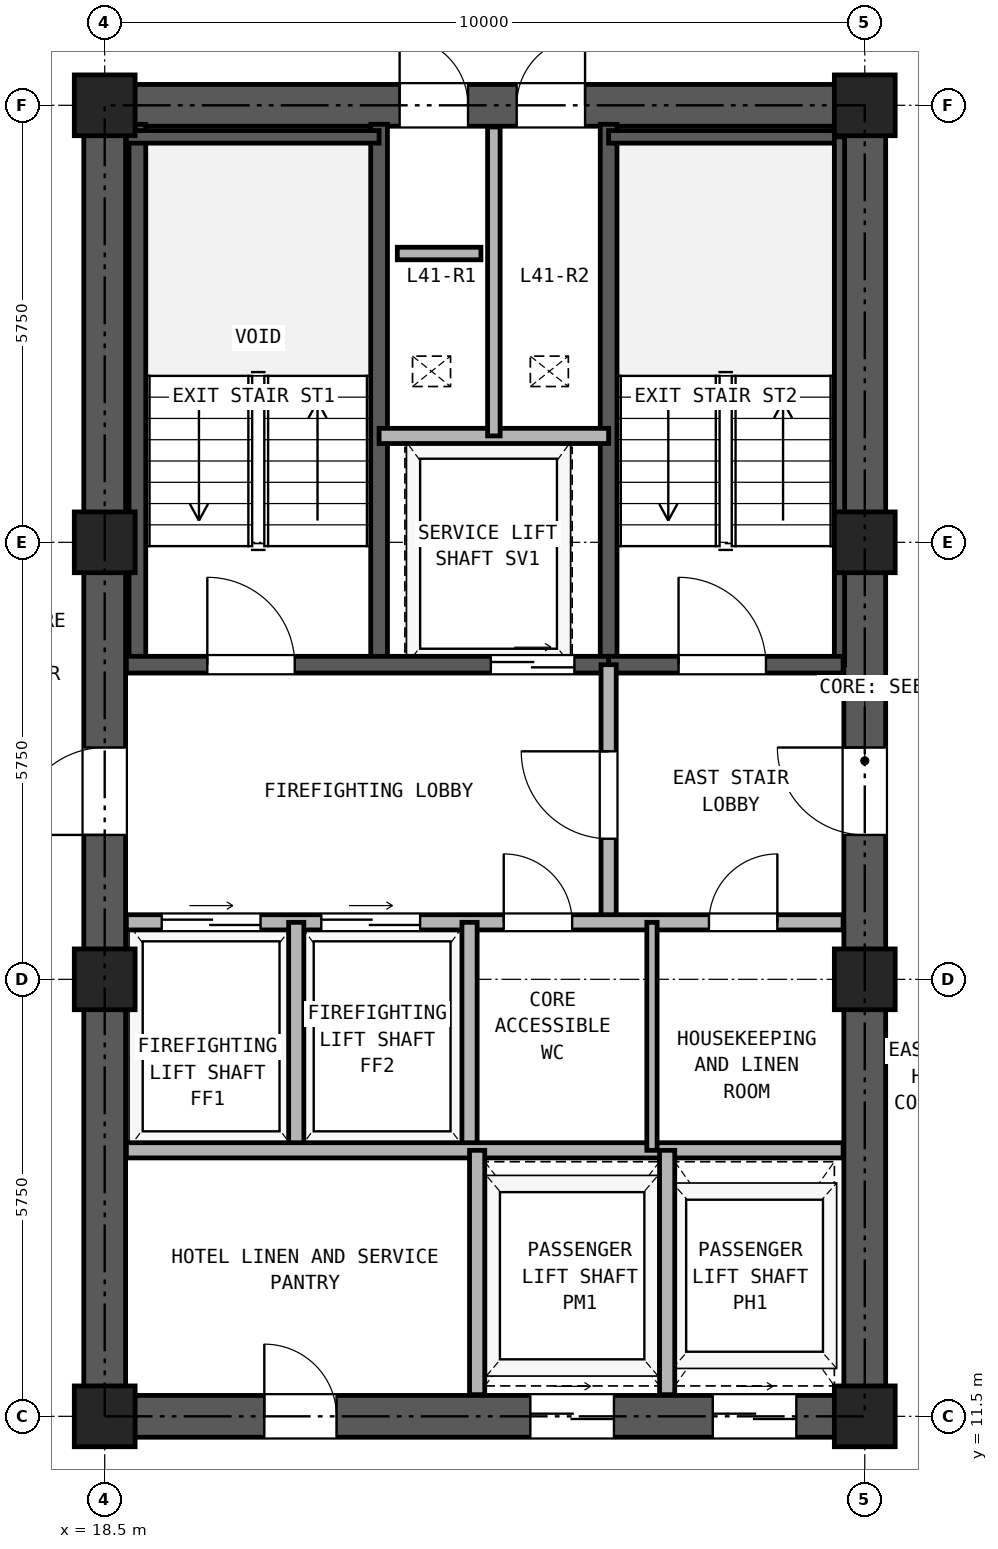
"""IFC4 building model, lengths in metres.
Left out: names, types, materials, properties, quantities, classifications, styles, units other than length and angle.
Written with IfcOpenShell. Run it as: python <this file> out.ifc"""

import sys

from ifc_helpers import new_model, si_unit, direction, frame, frame_2d, origin, origin_2d, place, context, subcontext, project, spatial, rectangle, hollow_rectangle, extrude, source, transform, mapped, element, fill, save


model = new_model("IFC4")
c1 = context("Model", 3, precision=1e-05, world=origin(), true_north=direction((0.0, 1.0)))
c2 = subcontext(c1, "Body", "Model", "MODEL_VIEW")
j1 = project(units=[si_unit("LENGTHUNIT", "METRE"), si_unit("PLANEANGLEUNIT", "RADIAN")], contexts=[c1])
p1 = place(None, origin())
s1 = spatial("IfcSite", under=j1, at=p1, CompositionType="ELEMENT")
p2 = place(p1, origin())
s2 = spatial("IfcBuilding", under=s1, at=p2, CompositionType="ELEMENT")
p3 = place(p2, frame((0.0, 0.0, 148.4)))
s3 = spatial("IfcBuildingStorey", under=s2, at=p3, CompositionType="ELEMENT", Elevation=148.4)
m1 = source(origin(), c2, "Body", "SweptSolid", [
    extrude(hollow_rectangle(XDim=0.8, YDim=0.8, WallThickness=0.045, at=origin_2d()), origin(), (0.0, 0.0, 1.0), 2.84),
])
for number, where, z_axis, x_axis in (
    (1, (18.5, 11.5, 0.0), (0.0, 0.0, 1.0), (1.0, 0.0, 0.0)),
    (2, (18.5, 17.25, 0.0), (0.0, 0.0, 1.0), (1.0, 0.0, 0.0)),
    (3, (18.5, 23.0, 0.0), (0.0, 0.0, 1.0), (1.0, 0.0, 0.0)),
    (4, (18.5, 28.75, 0.0), (0.0, 0.0, 1.0), (1.0, 0.0, 0.0)),
    (5, (28.5, 11.5, 0.0), (0.0, 0.0, 1.0), (1.0, 0.0, 0.0)),
    (6, (28.5, 17.25, 0.0), (0.0, 0.0, 1.0), (1.0, 0.0, 0.0)),
    (7, (28.5, 23.0, 0.0), (0.0, 0.0, 1.0), (1.0, 0.0, 0.0)),
    (8, (28.5, 28.75, 0.0), (0.0, 0.0, 1.0), (1.0, 0.0, 0.0)),
):
    element("IfcColumn", number, at=place(p3, frame(where, z_axis=z_axis, x_axis=x_axis)), inside=s3, PredefinedType="COLUMN", context=c2, shape_type="MappedRepresentation", body=[
        mapped(m1, transform((0.0, 0.0, 0.0), x_axis=(1.0, 0.0, 0.0), y_axis=(0.0, 1.0, 0.0), z_axis=(0.0, 0.0, 1.0), scale=1.0)),
    ])
p4 = place(p3, frame((18.225, 11.5, 0.0), z_axis=(0.0, 0.0, 1.0), x_axis=(1.0, 0.0, 0.0)))
e9 = element("IfcWall", 9, at=p4, inside=s3, PredefinedType="SHEAR", context=c2, shape_type="SweptSolid", body=[
    extrude(rectangle(XDim=10.55, YDim=0.55, at=frame_2d((5.275, 0.0))), origin(), (0.0, 0.0, 1.0), 2.84),
])
p5 = place(p4, frame((2.375, 0.0, 0.0)))
e10 = element("IfcOpeningElement", 10, at=p5, cuts=e9, PredefinedType="OPENING", context=c2, shape_type="SweptSolid", body=[
    extrude(rectangle(XDim=0.95, YDim=2.15, at=frame_2d((0.475, 1.075))), frame((0.0, 0.285, 0.0), z_axis=(0.0, -1.0, 0.0), x_axis=(1.0, 0.0, 0.0)), (0.0, 0.0, 1.0), 0.57),
])
p6 = place(p4, frame((5.875, 0.0, 0.0)))
e11 = element("IfcOpeningElement", 11, at=p6, cuts=e9, PredefinedType="OPENING", context=c2, shape_type="SweptSolid", body=[
    extrude(rectangle(XDim=1.1, YDim=2.25, at=frame_2d((0.55, 1.125))), frame((0.0, 0.285, 0.0), z_axis=(0.0, -1.0, 0.0), x_axis=(1.0, 0.0, 0.0)), (0.0, 0.0, 1.0), 0.57),
])
p7 = place(p4, frame((8.275, 0.0, 0.0)))
e12 = element("IfcOpeningElement", 12, at=p7, cuts=e9, PredefinedType="OPENING", context=c2, shape_type="SweptSolid", body=[
    extrude(rectangle(XDim=1.1, YDim=2.25, at=frame_2d((0.55, 1.125))), frame((0.0, 0.285, 0.0), z_axis=(0.0, -1.0, 0.0), x_axis=(1.0, 0.0, 0.0)), (0.0, 0.0, 1.0), 0.57),
])
p8 = place(p3, frame((18.225, 28.75, 0.0), z_axis=(0.0, 0.0, 1.0), x_axis=(1.0, 0.0, 0.0)))
e13 = element("IfcWall", 13, at=p8, inside=s3, PredefinedType="SHEAR", context=c2, shape_type="SweptSolid", body=[
    extrude(rectangle(XDim=10.55, YDim=0.55, at=frame_2d((5.275, 0.0))), origin(), (0.0, 0.0, 1.0), 2.84),
])
p9 = place(p8, frame((4.155, 0.0, 0.0)))
e14 = element("IfcOpeningElement", 14, at=p9, cuts=e13, PredefinedType="OPENING", context=c2, shape_type="SweptSolid", body=[
    extrude(rectangle(XDim=0.9, YDim=2.05, at=frame_2d((0.45, 1.025))), frame((0.0, 0.285, 0.0), z_axis=(0.0, -1.0, 0.0), x_axis=(1.0, 0.0, 0.0)), (0.0, 0.0, 1.0), 0.57),
])
p10 = place(p8, frame((5.695, 0.0, 0.0)))
e15 = element("IfcOpeningElement", 15, at=p10, cuts=e13, PredefinedType="OPENING", context=c2, shape_type="SweptSolid", body=[
    extrude(rectangle(XDim=0.9, YDim=2.05, at=frame_2d((0.45, 1.025))), frame((0.0, 0.285, 0.0), z_axis=(0.0, -1.0, 0.0), x_axis=(1.0, 0.0, 0.0)), (0.0, 0.0, 1.0), 0.57),
])
p11 = place(p3, frame((18.5, 11.775, 0.0), z_axis=(0.0, 0.0, 1.0), x_axis=(0.0, 1.0, 0.0)))
e16 = element("IfcWall", 16, at=p11, inside=s3, PredefinedType="SHEAR", context=c2, shape_type="SweptSolid", body=[
    extrude(rectangle(XDim=16.7, YDim=0.55, at=frame_2d((8.35, 0.0))), origin(), (0.0, 0.0, 1.0), 2.84),
])
p12 = place(p11, frame((7.375, 0.0, 0.0)))
e17 = element("IfcOpeningElement", 17, at=p12, cuts=e16, PredefinedType="OPENING", context=c2, shape_type="SweptSolid", body=[
    extrude(rectangle(XDim=1.15, YDim=2.2, at=frame_2d((0.575, 1.1))), frame((0.0, 0.285, 0.0), z_axis=(0.0, -1.0, 0.0), x_axis=(1.0, 0.0, 0.0)), (0.0, 0.0, 1.0), 0.57),
])
p13 = place(p3, frame((28.5, 11.775, 0.0), z_axis=(0.0, 0.0, 1.0), x_axis=(0.0, 1.0, 0.0)))
e18 = element("IfcWall", 18, at=p13, inside=s3, PredefinedType="SHEAR", context=c2, shape_type="SweptSolid", body=[
    extrude(rectangle(XDim=16.7, YDim=0.55, at=frame_2d((8.35, 0.0))), origin(), (0.0, 0.0, 1.0), 2.84),
])
p14 = place(p13, frame((7.375, 0.0, 0.0)))
e19 = element("IfcOpeningElement", 19, at=p14, cuts=e18, PredefinedType="OPENING", context=c2, shape_type="SweptSolid", body=[
    extrude(rectangle(XDim=1.15, YDim=2.2, at=frame_2d((0.575, 1.1))), frame((0.0, 0.285, 0.0), z_axis=(0.0, -1.0, 0.0), x_axis=(1.0, 0.0, 0.0)), (0.0, 0.0, 1.0), 0.57),
])
for number, where, z_axis, x_axis in (
    (20, (18.93, 21.39, 0.0), (0.0, 0.0, 1.0), (0.0, 1.0, 0.0)),
    (21, (22.11, 21.39, 0.0), (0.0, 0.0, 1.0), (0.0, 1.0, 0.0)),
    (22, (25.13, 21.39, 0.0), (0.0, 0.0, 1.0), (0.0, 1.0, 0.0)),
):
    element("IfcWall", number, at=place(p3, frame(where, z_axis=z_axis, x_axis=x_axis)), inside=s3, PredefinedType="SOLIDWALL", context=c2, shape_type="SweptSolid", body=[
        extrude(rectangle(XDim=7.11, YDim=0.22, at=frame_2d((3.555, 0.0))), origin(), (0.0, 0.0, 1.0), 2.84),
    ])
p15 = place(p3, frame((18.785, 28.335, 0.0), z_axis=(0.0, 0.0, 1.0), x_axis=(1.0, 0.0, 0.0)))
e23 = element("IfcWall", 23, at=p15, inside=s3, PredefinedType="PARTITIONING", context=c2, shape_type="SweptSolid", body=[
    extrude(rectangle(XDim=3.325, YDim=0.165, at=frame_2d((1.663, 0.0))), origin(), (0.0, 0.0, 1.0), 2.84),
])
p16 = place(p3, frame((25.13, 28.335, 0.0), z_axis=(0.0, 0.0, 1.0), x_axis=(1.0, 0.0, 0.0)))
e24 = element("IfcWall", 24, at=p16, inside=s3, PredefinedType="PARTITIONING", context=c2, shape_type="SweptSolid", body=[
    extrude(rectangle(XDim=3.085, YDim=0.165, at=frame_2d((1.542, 0.0))), origin(), (0.0, 0.0, 1.0), 2.84),
])
p17 = place(p3, frame((28.167, 21.39, 0.0), z_axis=(0.0, 0.0, 1.0), x_axis=(0.0, 1.0, 0.0)))
e25 = element("IfcWall", 25, at=p17, inside=s3, PredefinedType="PARTITIONING", context=c2, shape_type="SweptSolid", body=[
    extrude(rectangle(XDim=6.945, YDim=0.135, at=frame_2d((3.473, 0.0))), origin(), (0.0, 0.0, 1.0), 2.84),
])
p18 = place(p3, frame((18.785, 21.39, 0.0), z_axis=(0.0, 0.0, 1.0), x_axis=(1.0, 0.0, 0.0)))
e26 = element("IfcWall", 26, at=p18, inside=s3, PredefinedType="SOLIDWALL", context=c2, shape_type="SweptSolid", body=[
    extrude(rectangle(XDim=6.345, YDim=0.22, at=frame_2d((3.172, 0.0))), origin(), (0.0, 0.0, 1.0), 2.84),
])
p19 = place(p18, frame((1.065, 0.0, 0.0)))
e27 = element("IfcOpeningElement", 27, at=p19, cuts=e26, PredefinedType="OPENING", context=c2, shape_type="SweptSolid", body=[
    extrude(rectangle(XDim=1.15, YDim=2.2, at=frame_2d((0.575, 1.1))), frame((0.0, 0.12, 0.0), z_axis=(0.0, -1.0, 0.0), x_axis=(1.0, 0.0, 0.0)), (0.0, 0.0, 1.0), 0.24),
])
p20 = place(p18, frame((4.795, 0.0, 0.0)))
e28 = element("IfcOpeningElement", 28, at=p20, cuts=e26, PredefinedType="OPENING", context=c2, shape_type="SweptSolid", body=[
    extrude(rectangle(XDim=1.1, YDim=2.25, at=frame_2d((0.55, 1.125))), frame((0.0, 0.12, 0.0), z_axis=(0.0, -1.0, 0.0), x_axis=(1.0, 0.0, 0.0)), (0.0, 0.0, 1.0), 0.24),
])
p21 = place(p3, frame((25.13, 21.39, 0.0), z_axis=(0.0, 0.0, 1.0), x_axis=(1.0, 0.0, 0.0)))
e29 = element("IfcWall", 29, at=p21, inside=s3, PredefinedType="SOLIDWALL", context=c2, shape_type="SweptSolid", body=[
    extrude(rectangle(XDim=3.085, YDim=0.22, at=frame_2d((1.542, 0.0))), origin(), (0.0, 0.0, 1.0), 2.84),
])
p22 = place(p21, frame((0.92, 0.0, 0.0)))
e30 = element("IfcOpeningElement", 30, at=p22, cuts=e29, PredefinedType="OPENING", context=c2, shape_type="SweptSolid", body=[
    extrude(rectangle(XDim=1.15, YDim=2.2, at=frame_2d((0.575, 1.1))), frame((0.0, 0.12, 0.0), z_axis=(0.0, -1.0, 0.0), x_axis=(1.0, 0.0, 0.0)), (0.0, 0.0, 1.0), 0.24),
])
p23 = place(p3, frame((22.11, 24.4, 0.0), z_axis=(0.0, 0.0, 1.0), x_axis=(1.0, 0.0, 0.0)))
e31 = element("IfcWall", 31, at=p23, inside=s3, PredefinedType="PARTITIONING", context=c2, shape_type="SweptSolid", body=[
    extrude(rectangle(XDim=3.02, YDim=0.2, at=frame_2d((1.51, 0.0))), origin(), (0.0, 0.0, 1.0), 2.84),
])
p24 = place(p3, frame((23.62, 24.4, 0.0), z_axis=(0.0, 0.0, 1.0), x_axis=(0.0, 1.0, 0.0)))
e32 = element("IfcWall", 32, at=p24, inside=s3, PredefinedType="PARTITIONING", context=c2, shape_type="SweptSolid", body=[
    extrude(rectangle(XDim=4.065, YDim=0.165, at=frame_2d((2.033, 0.0))), origin(), (0.0, 0.0, 1.0), 2.84),
])
p25 = place(p3, frame((25.13, 18.0, 0.0), z_axis=(0.0, 0.0, 1.0), x_axis=(0.0, 1.0, 0.0)))
e33 = element("IfcWall", 33, at=p25, inside=s3, PredefinedType="PARTITIONING", context=c2, shape_type="SweptSolid", body=[
    extrude(rectangle(XDim=3.39, YDim=0.2, at=frame_2d((1.695, 0.0))), origin(), (0.0, 0.0, 1.0), 2.84),
])
p26 = place(p25, frame((1.1, 0.0, 0.0)))
e34 = element("IfcOpeningElement", 34, at=p26, cuts=e33, PredefinedType="OPENING", context=c2, shape_type="SweptSolid", body=[
    extrude(rectangle(XDim=1.15, YDim=2.2, at=frame_2d((0.575, 1.1))), frame((0.0, 0.11, 0.0), z_axis=(0.0, -1.0, 0.0), x_axis=(1.0, 0.0, 0.0)), (0.0, 0.0, 1.0), 0.22),
])
p27 = place(p3, frame((18.785, 18.0, 0.0), z_axis=(0.0, 0.0, 1.0), x_axis=(1.0, 0.0, 0.0)))
e35 = element("IfcWall", 35, at=p27, inside=s3, PredefinedType="PARTITIONING", context=c2, shape_type="SweptSolid", body=[
    extrude(rectangle(XDim=9.43, YDim=0.2, at=frame_2d((4.715, 0.0))), origin(), (0.0, 0.0, 1.0), 2.84),
])
p28 = place(p27, frame((0.465, 0.0, 0.0)))
e36 = element("IfcOpeningElement", 36, at=p28, cuts=e35, PredefinedType="OPENING", context=c2, shape_type="SweptSolid", body=[
    extrude(rectangle(XDim=1.3, YDim=2.3, at=frame_2d((0.65, 1.15))), frame((0.0, 0.11, 0.0), z_axis=(0.0, -1.0, 0.0), x_axis=(1.0, 0.0, 0.0)), (0.0, 0.0, 1.0), 0.22),
])
p29 = place(p27, frame((2.565, 0.0, 0.0)))
e37 = element("IfcOpeningElement", 37, at=p29, cuts=e35, PredefinedType="OPENING", context=c2, shape_type="SweptSolid", body=[
    extrude(rectangle(XDim=1.3, YDim=2.3, at=frame_2d((0.65, 1.15))), frame((0.0, 0.11, 0.0), z_axis=(0.0, -1.0, 0.0), x_axis=(1.0, 0.0, 0.0)), (0.0, 0.0, 1.0), 0.22),
])
p30 = place(p27, frame((4.965, 0.0, 0.0)))
e38 = element("IfcOpeningElement", 38, at=p30, cuts=e35, PredefinedType="OPENING", context=c2, shape_type="SweptSolid", body=[
    extrude(rectangle(XDim=0.9, YDim=2.05, at=frame_2d((0.45, 1.025))), frame((0.0, 0.11, 0.0), z_axis=(0.0, -1.0, 0.0), x_axis=(1.0, 0.0, 0.0)), (0.0, 0.0, 1.0), 0.22),
])
p31 = place(p27, frame((7.665, 0.0, 0.0)))
e39 = element("IfcOpeningElement", 39, at=p31, cuts=e35, PredefinedType="OPENING", context=c2, shape_type="SweptSolid", body=[
    extrude(rectangle(XDim=0.9, YDim=2.05, at=frame_2d((0.45, 1.025))), frame((0.0, 0.11, 0.0), z_axis=(0.0, -1.0, 0.0), x_axis=(1.0, 0.0, 0.0)), (0.0, 0.0, 1.0), 0.22),
])
for number, where, z_axis, x_axis in (
    (40, (21.02, 15.0, 0.0), (0.0, 0.0, 1.0), (0.0, 1.0, 0.0)),
    (41, (23.3, 15.0, 0.0), (0.0, 0.0, 1.0), (0.0, 1.0, 0.0)),
):
    element("IfcWall", number, at=place(p3, frame(where, z_axis=z_axis, x_axis=x_axis)), inside=s3, PredefinedType="PARTITIONING", context=c2, shape_type="SweptSolid", body=[
        extrude(rectangle(XDim=3.0, YDim=0.2, at=frame_2d((1.5, 0.0))), origin(), (0.0, 0.0, 1.0), 2.84),
    ])
p32 = place(p3, frame((18.785, 15.0, 0.0), z_axis=(0.0, 0.0, 1.0), x_axis=(1.0, 0.0, 0.0)))
e42 = element("IfcWall", 42, at=p32, inside=s3, PredefinedType="PARTITIONING", context=c2, shape_type="SweptSolid", body=[
    extrude(rectangle(XDim=9.43, YDim=0.2, at=frame_2d((4.715, 0.0))), origin(), (0.0, 0.0, 1.0), 2.84),
])
p33 = place(p3, frame((25.7, 15.0, 0.0), z_axis=(0.0, 0.0, 1.0), x_axis=(0.0, 1.0, 0.0)))
e43 = element("IfcWall", 43, at=p33, inside=s3, PredefinedType="PARTITIONING", context=c2, shape_type="SweptSolid", body=[
    extrude(rectangle(XDim=3.0, YDim=0.135, at=frame_2d((1.5, 0.0))), origin(), (0.0, 0.0, 1.0), 2.84),
])
for number, where, z_axis, x_axis in (
    (44, (23.4, 11.785, 0.0), (0.0, 0.0, 1.0), (0.0, 1.0, 0.0)),
    (45, (25.9, 11.785, 0.0), (0.0, 0.0, 1.0), (0.0, 1.0, 0.0)),
):
    element("IfcWall", number, at=place(p3, frame(where, z_axis=z_axis, x_axis=x_axis)), inside=s3, PredefinedType="PARTITIONING", context=c2, shape_type="SweptSolid", body=[
        extrude(rectangle(XDim=3.215, YDim=0.2, at=frame_2d((1.607, 0.0))), origin(), (0.0, 0.0, 1.0), 2.84),
    ])
p34 = place(p3, frame((22.35, 26.8, 0.0), z_axis=(0.0, 0.0, 1.0), x_axis=(1.0, 0.0, 0.0)))
e46 = element("IfcWall", 46, at=p34, inside=s3, PredefinedType="PARTITIONING", context=c2, shape_type="SweptSolid", body=[
    extrude(rectangle(XDim=1.1, YDim=0.165, at=frame_2d((0.55, 0.0))), origin(), (0.0, 0.0, 1.0), 2.84),
])
p35 = place(p19, frame((1.15, 0.0, 0.0), z_axis=(0.0, 0.0, 1.0), x_axis=(-1.0, 0.0, 0.0)))
e47 = element("IfcDoor", 47, at=p35, inside=s3, OperationType="SINGLE_SWING_LEFT", PredefinedType="DOOR", context=c2, shape_type="SweptSolid", body=[
    extrude(rectangle(XDim=1.15, YDim=2.2, at=frame_2d((0.575, 1.1))), frame((0.0, 0.025, 0.0), z_axis=(0.0, -1.0, 0.0), x_axis=(1.0, 0.0, 0.0)), (0.0, 0.0, 1.0), 0.05),
])
fill(e27, e47)
p36 = place(p22, frame((1.15, 0.0, 0.0), z_axis=(0.0, 0.0, 1.0), x_axis=(-1.0, 0.0, 0.0)))
e48 = element("IfcDoor", 48, at=p36, inside=s3, OperationType="SINGLE_SWING_LEFT", PredefinedType="DOOR", context=c2, shape_type="SweptSolid", body=[
    extrude(rectangle(XDim=1.15, YDim=2.2, at=frame_2d((0.575, 1.1))), frame((0.0, 0.025, 0.0), z_axis=(0.0, -1.0, 0.0), x_axis=(1.0, 0.0, 0.0)), (0.0, 0.0, 1.0), 0.05),
])
fill(e30, e48)
p37 = place(p20, frame((1.1, 0.0, 0.0), z_axis=(0.0, 0.0, 1.0), x_axis=(-1.0, 0.0, 0.0)))
e49 = element("IfcDoor", 49, at=p37, inside=s3, OperationType="DOUBLE_DOOR_SLIDING", PredefinedType="DOOR", context=c2, shape_type="SweptSolid", body=[
    extrude(rectangle(XDim=1.1, YDim=2.25, at=frame_2d((0.55, 1.125))), frame((0.0, 0.025, 0.0), z_axis=(0.0, -1.0, 0.0), x_axis=(1.0, 0.0, 0.0)), (0.0, 0.0, 1.0), 0.05),
])
fill(e28, e49)
p38 = place(p26, origin())
e50 = element("IfcDoor", 50, at=p38, inside=s3, OperationType="SINGLE_SWING_RIGHT", PredefinedType="DOOR", context=c2, shape_type="SweptSolid", body=[
    extrude(rectangle(XDim=1.15, YDim=2.2, at=frame_2d((0.575, 1.1))), frame((0.0, 0.025, 0.0), z_axis=(0.0, -1.0, 0.0), x_axis=(1.0, 0.0, 0.0)), (0.0, 0.0, 1.0), 0.05),
])
fill(e34, e50)
p39 = place(p28, origin())
e51 = element("IfcDoor", 51, at=p39, inside=s3, OperationType="DOUBLE_DOOR_SLIDING", PredefinedType="DOOR", context=c2, shape_type="SweptSolid", body=[
    extrude(rectangle(XDim=1.3, YDim=2.3, at=frame_2d((0.65, 1.15))), frame((0.0, 0.025, 0.0), z_axis=(0.0, -1.0, 0.0), x_axis=(1.0, 0.0, 0.0)), (0.0, 0.0, 1.0), 0.05),
])
fill(e36, e51)
p40 = place(p29, origin())
e52 = element("IfcDoor", 52, at=p40, inside=s3, OperationType="DOUBLE_DOOR_SLIDING", PredefinedType="DOOR", context=c2, shape_type="SweptSolid", body=[
    extrude(rectangle(XDim=1.3, YDim=2.3, at=frame_2d((0.65, 1.15))), frame((0.0, 0.025, 0.0), z_axis=(0.0, -1.0, 0.0), x_axis=(1.0, 0.0, 0.0)), (0.0, 0.0, 1.0), 0.05),
])
fill(e37, e52)
p41 = place(p30, frame((0.9, 0.0, 0.0), z_axis=(0.0, 0.0, 1.0), x_axis=(-1.0, 0.0, 0.0)))
e53 = element("IfcDoor", 53, at=p41, inside=s3, OperationType="SINGLE_SWING_LEFT", PredefinedType="DOOR", context=c2, shape_type="SweptSolid", body=[
    extrude(rectangle(XDim=0.9, YDim=2.05, at=frame_2d((0.45, 1.025))), frame((0.0, 0.025, 0.0), z_axis=(0.0, -1.0, 0.0), x_axis=(1.0, 0.0, 0.0)), (0.0, 0.0, 1.0), 0.05),
])
fill(e38, e53)
p42 = place(p31, frame((0.9, 0.0, 0.0), z_axis=(0.0, 0.0, 1.0), x_axis=(-1.0, 0.0, 0.0)))
e54 = element("IfcDoor", 54, at=p42, inside=s3, OperationType="SINGLE_SWING_RIGHT", PredefinedType="DOOR", context=c2, shape_type="SweptSolid", body=[
    extrude(rectangle(XDim=0.9, YDim=2.05, at=frame_2d((0.45, 1.025))), frame((0.0, 0.025, 0.0), z_axis=(0.0, -1.0, 0.0), x_axis=(1.0, 0.0, 0.0)), (0.0, 0.0, 1.0), 0.05),
])
fill(e39, e54)
p43 = place(p12, frame((1.15, 0.0, 0.0), z_axis=(0.0, 0.0, 1.0), x_axis=(-1.0, 0.0, 0.0)))
e55 = element("IfcDoor", 55, at=p43, inside=s3, OperationType="SINGLE_SWING_LEFT", PredefinedType="DOOR", context=c2, shape_type="SweptSolid", body=[
    extrude(rectangle(XDim=1.15, YDim=2.2, at=frame_2d((0.575, 1.1))), frame((0.0, 0.025, 0.0), z_axis=(0.0, -1.0, 0.0), x_axis=(1.0, 0.0, 0.0)), (0.0, 0.0, 1.0), 0.05),
])
fill(e17, e55)
p44 = place(p14, origin())
e56 = element("IfcDoor", 56, at=p44, inside=s3, OperationType="SINGLE_SWING_RIGHT", PredefinedType="DOOR", context=c2, shape_type="SweptSolid", body=[
    extrude(rectangle(XDim=1.15, YDim=2.2, at=frame_2d((0.575, 1.1))), frame((0.0, 0.025, 0.0), z_axis=(0.0, -1.0, 0.0), x_axis=(1.0, 0.0, 0.0)), (0.0, 0.0, 1.0), 0.05),
])
fill(e19, e56)
p45 = place(p9, origin())
e57 = element("IfcDoor", 57, at=p45, inside=s3, OperationType="SINGLE_SWING_LEFT", PredefinedType="DOOR", context=c2, shape_type="SweptSolid", body=[
    extrude(rectangle(XDim=0.9, YDim=2.05, at=frame_2d((0.45, 1.025))), frame((0.0, 0.025, 0.0), z_axis=(0.0, -1.0, 0.0), x_axis=(1.0, 0.0, 0.0)), (0.0, 0.0, 1.0), 0.05),
])
fill(e14, e57)
p46 = place(p10, origin())
e58 = element("IfcDoor", 58, at=p46, inside=s3, OperationType="SINGLE_SWING_RIGHT", PredefinedType="DOOR", context=c2, shape_type="SweptSolid", body=[
    extrude(rectangle(XDim=0.9, YDim=2.05, at=frame_2d((0.45, 1.025))), frame((0.0, 0.025, 0.0), z_axis=(0.0, -1.0, 0.0), x_axis=(1.0, 0.0, 0.0)), (0.0, 0.0, 1.0), 0.05),
])
fill(e15, e58)
p47 = place(p5, frame((0.95, 0.0, 0.0), z_axis=(0.0, 0.0, 1.0), x_axis=(-1.0, 0.0, 0.0)))
e59 = element("IfcDoor", 59, at=p47, inside=s3, OperationType="SINGLE_SWING_LEFT", PredefinedType="DOOR", context=c2, shape_type="SweptSolid", body=[
    extrude(rectangle(XDim=0.95, YDim=2.15, at=frame_2d((0.475, 1.075))), frame((0.0, 0.025, 0.0), z_axis=(0.0, -1.0, 0.0), x_axis=(1.0, 0.0, 0.0)), (0.0, 0.0, 1.0), 0.05),
])
fill(e10, e59)
p48 = place(p6, frame((1.1, 0.0, 0.0), z_axis=(0.0, 0.0, 1.0), x_axis=(-1.0, 0.0, 0.0)))
e60 = element("IfcDoor", 60, at=p48, inside=s3, OperationType="DOUBLE_DOOR_SLIDING", PredefinedType="DOOR", context=c2, shape_type="SweptSolid", body=[
    extrude(rectangle(XDim=1.1, YDim=2.25, at=frame_2d((0.55, 1.125))), frame((0.0, 0.025, 0.0), z_axis=(0.0, -1.0, 0.0), x_axis=(1.0, 0.0, 0.0)), (0.0, 0.0, 1.0), 0.05),
])
fill(e11, e60)
p49 = place(p7, frame((1.1, 0.0, 0.0), z_axis=(0.0, 0.0, 1.0), x_axis=(-1.0, 0.0, 0.0)))
e61 = element("IfcDoor", 61, at=p49, inside=s3, OperationType="DOUBLE_DOOR_SLIDING", PredefinedType="DOOR", context=c2, shape_type="SweptSolid", body=[
    extrude(rectangle(XDim=1.1, YDim=2.25, at=frame_2d((0.55, 1.125))), frame((0.0, 0.025, 0.0), z_axis=(0.0, -1.0, 0.0), x_axis=(1.0, 0.0, 0.0)), (0.0, 0.0, 1.0), 0.05),
])
fill(e12, e61)
save(model, sys.argv[1])
